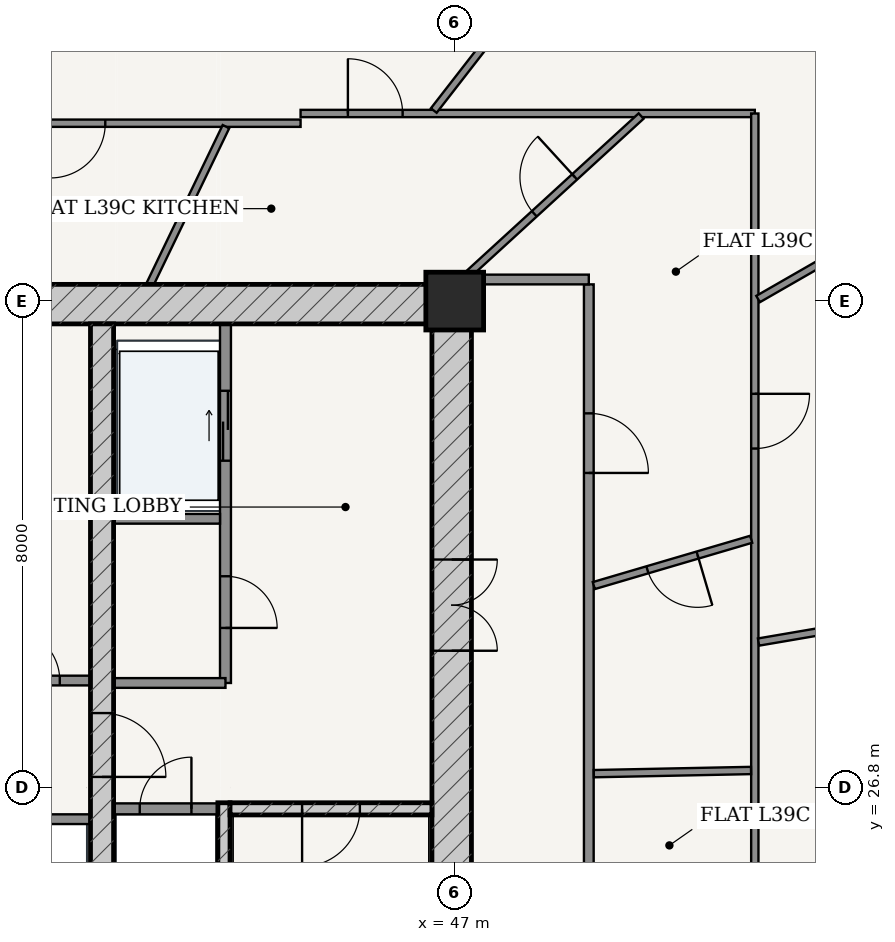
"""IFC4 building model, lengths in metres.
Left out: names, types, materials, properties, quantities, classifications, styles, units other than length and angle.
Written with IfcOpenShell. Run it as: python <this file> out.ifc"""

import sys

from ifc_helpers import new_model, si_unit, direction, frame, frame_2d, origin, origin_2d, place, context, subcontext, project, spatial, rectangle, extrude, source, transform, mapped, element, fill, save


model = new_model("IFC4")
c1 = context("Model", 3, precision=1e-05, world=origin(), true_north=direction((-0.2419218956, 0.970295726276)))
c2 = subcontext(c1, "Body", "Model", "MODEL_VIEW")
j1 = project(units=[si_unit("LENGTHUNIT", "METRE"), si_unit("PLANEANGLEUNIT", "RADIAN")], contexts=[c1])
p1 = place(None, origin())
s1 = spatial("IfcSite", under=j1, at=p1, CompositionType="ELEMENT")
p2 = place(p1, origin())
s2 = spatial("IfcBuilding", under=s1, at=p2, CompositionType="ELEMENT")
p3 = place(p2, frame((0.0, 0.0, 149.8)))
s3 = spatial("IfcBuildingStorey", under=s2, at=p3, CompositionType="ELEMENT", Elevation=149.8)
p4 = place(p3, frame((47.0, 34.8, 0.0), z_axis=(0.0, 0.0, 1.0), x_axis=(1.0, 0.0, 0.0)))
e1 = element("IfcColumn", 1, at=p4, inside=s3, PredefinedType="COLUMN", context=c2, shape_type="SweptSolid", body=[
    extrude(rectangle(XDim=0.95, YDim=0.95, at=origin_2d()), origin(), (0.0, 0.0, 1.0), 3.6),
])
p5 = place(p3, frame((28.725, 34.75, 0.0), z_axis=(0.0, 0.0, 1.0), x_axis=(1.0, 0.0, 0.0)))
e2 = element("IfcWall", 2, at=p5, inside=s3, PredefinedType="SHEAR", context=c2, shape_type="SweptSolid", body=[
    extrude(rectangle(XDim=18.55, YDim=0.65, at=frame_2d((9.275, 0.0))), origin(), (0.0, 0.0, 1.0), 3.33),
])
p6 = place(p3, frame((46.95, 19.175, 0.0), z_axis=(0.0, 0.0, 1.0), x_axis=(0.0, 1.0, 0.0)))
e3 = element("IfcWall", 3, at=p6, inside=s3, PredefinedType="SHEAR", context=c2, shape_type="SweptSolid", body=[
    extrude(rectangle(XDim=15.25, YDim=0.65, at=frame_2d((7.625, 0.0))), origin(), (0.0, 0.0, 1.0), 3.33),
])
p7 = place(p6, frame((9.875, 0.0, 0.0)))
e4 = element("IfcOpeningElement", 4, at=p7, cuts=e3, PredefinedType="OPENING", context=c2, shape_type="SweptSolid", body=[
    extrude(rectangle(XDim=1.5, YDim=2.2, at=frame_2d((0.75, 1.1))), frame((0.0, 0.335, 0.0), z_axis=(0.0, -1.0, 0.0), x_axis=(1.0, 0.0, 0.0)), (0.0, 0.0, 1.0), 0.67),
])
p8 = place(p3, frame((43.205, 19.175, 0.0), z_axis=(0.0, 0.0, 1.0), x_axis=(0.0, 1.0, 0.0)))
e5 = element("IfcWall", 5, at=p8, inside=s3, PredefinedType="SOLIDWALL", context=c2, shape_type="SweptSolid", body=[
    extrude(rectangle(XDim=7.375, YDim=0.2, at=frame_2d((3.688, 0.0))), origin(), (0.0, 0.0, 1.0), 3.33),
])
p9 = place(p3, frame((43.305, 26.45, 0.0), z_axis=(0.0, 0.0, 1.0), x_axis=(1.0, 0.0, 0.0)))
e6 = element("IfcWall", 6, at=p9, inside=s3, PredefinedType="SOLIDWALL", context=c2, shape_type="SweptSolid", body=[
    extrude(rectangle(XDim=3.32, YDim=0.2, at=frame_2d((1.66, 0.0))), origin(), (0.0, 0.0, 1.0), 3.33),
])
p10 = place(p9, frame((1.185, 0.0, 0.0)))
e7 = element("IfcOpeningElement", 7, at=p10, cuts=e6, PredefinedType="OPENING", context=c2, shape_type="SweptSolid", body=[
    extrude(rectangle(XDim=0.95, YDim=2.15, at=frame_2d((0.475, 1.075))), frame((0.0, 0.11, 0.0), z_axis=(0.0, -1.0, 0.0), x_axis=(1.0, 0.0, 0.0)), (0.0, 0.0, 1.0), 0.22),
])
p11 = place(p3, frame((41.2, 19.175, 0.0), z_axis=(0.0, 0.0, 1.0), x_axis=(0.0, 1.0, 0.0)))
e8 = element("IfcWall", 8, at=p11, inside=s3, PredefinedType="SHEAR", context=c2, shape_type="SweptSolid", body=[
    extrude(rectangle(XDim=15.25, YDim=0.38, at=frame_2d((7.625, 0.0))), origin(), (0.0, 0.0, 1.0), 3.33),
])
p12 = place(p11, frame((7.8, 0.0, 0.0)))
e9 = element("IfcOpeningElement", 9, at=p12, cuts=e8, PredefinedType="OPENING", context=c2, shape_type="SweptSolid", body=[
    extrude(rectangle(XDim=1.05, YDim=2.15, at=frame_2d((0.525, 1.075))), frame((0.0, 0.2, 0.0), z_axis=(0.0, -1.0, 0.0), x_axis=(1.0, 0.0, 0.0)), (0.0, 0.0, 1.0), 0.4),
])
p13 = place(p3, frame((41.39, 26.45, 0.0), z_axis=(0.0, 0.0, 1.0), x_axis=(1.0, 0.0, 0.0)))
e10 = element("IfcWall", 10, at=p13, inside=s3, PredefinedType="PARTITIONING", context=c2, shape_type="SweptSolid", body=[
    extrude(rectangle(XDim=1.71, YDim=0.18, at=frame_2d((0.855, 0.0))), origin(), (0.0, 0.0, 1.0), 3.33),
])
p14 = place(p13, frame((0.43, 0.0, 0.0)))
e11 = element("IfcOpeningElement", 11, at=p14, cuts=e10, PredefinedType="OPENING", context=c2, shape_type="SweptSolid", body=[
    extrude(rectangle(XDim=0.85, YDim=2.1, at=frame_2d((0.425, 1.05))), frame((0.0, 0.1, 0.0), z_axis=(0.0, -1.0, 0.0), x_axis=(1.0, 0.0, 0.0)), (0.0, 0.0, 1.0), 0.2),
])
p15 = place(p3, frame((43.23, 28.52, 0.0), z_axis=(0.0, 0.0, 1.0), x_axis=(0.0, 1.0, 0.0)))
e12 = element("IfcWall", 12, at=p15, inside=s3, PredefinedType="PARTITIONING", context=c2, shape_type="SweptSolid", body=[
    extrude(rectangle(XDim=5.905, YDim=0.18, at=frame_2d((2.953, 0.0))), origin(), (0.0, 0.0, 1.0), 3.33),
])
p16 = place(p15, frame((0.905, 0.0, 0.0)))
e13 = element("IfcOpeningElement", 13, at=p16, cuts=e12, PredefinedType="OPENING", context=c2, shape_type="SweptSolid", body=[
    extrude(rectangle(XDim=0.85, YDim=2.1, at=frame_2d((0.425, 1.05))), frame((0.0, 0.1, 0.0), z_axis=(0.0, -1.0, 0.0), x_axis=(1.0, 0.0, 0.0)), (0.0, 0.0, 1.0), 0.2),
])
p17 = place(p15, frame((3.655, 0.0, 0.0)))
e14 = element("IfcOpeningElement", 14, at=p17, cuts=e12, PredefinedType="OPENING", context=c2, shape_type="SweptSolid", body=[
    extrude(rectangle(XDim=1.15, YDim=2.2, at=frame_2d((0.575, 1.1))), frame((0.0, 0.1, 0.0), z_axis=(0.0, -1.0, 0.0), x_axis=(1.0, 0.0, 0.0)), (0.0, 0.0, 1.0), 0.2),
])
p18 = place(p3, frame((41.39, 31.22, 0.0), z_axis=(0.0, 0.0, 1.0), x_axis=(1.0, 0.0, 0.0)))
e15 = element("IfcWall", 15, at=p18, inside=s3, PredefinedType="PARTITIONING", context=c2, shape_type="SweptSolid", body=[
    extrude(rectangle(XDim=1.75, YDim=0.16, at=frame_2d((0.875, 0.0))), origin(), (0.0, 0.0, 1.0), 3.33),
])
p19 = place(p3, frame((41.39, 28.52, 0.0), z_axis=(0.0, 0.0, 1.0), x_axis=(1.0, 0.0, 0.0)))
e16 = element("IfcWall", 16, at=p19, inside=s3, PredefinedType="PARTITIONING", context=c2, shape_type="SweptSolid", body=[
    extrude(rectangle(XDim=1.84, YDim=0.16, at=frame_2d((0.92, 0.0))), origin(), (0.0, 0.0, 1.0), 3.33),
])
p20 = place(p3, frame((34.99, 28.56, 0.0), z_axis=(0.0, 0.0, 1.0), x_axis=(1.0, 0.0, 0.0)))
e17 = element("IfcWall", 17, at=p20, inside=s3, PredefinedType="PARTITIONING", context=c2, shape_type="SweptSolid", body=[
    extrude(rectangle(XDim=6.02, YDim=0.16, at=frame_2d((3.01, 0.0))), origin(), (0.0, 0.0, 1.0), 3.33),
])
p21 = place(p20, frame((0.505, 0.0, 0.0)))
e18 = element("IfcOpeningElement", 18, at=p21, cuts=e17, PredefinedType="OPENING", context=c2, shape_type="SweptSolid", body=[
    extrude(rectangle(XDim=0.85, YDim=2.1, at=frame_2d((0.425, 1.05))), frame((0.0, 0.09, 0.0), z_axis=(0.0, -1.0, 0.0), x_axis=(1.0, 0.0, 0.0)), (0.0, 0.0, 1.0), 0.18),
])
p22 = place(p20, frame((2.58, 0.0, 0.0)))
e19 = element("IfcOpeningElement", 19, at=p22, cuts=e17, PredefinedType="OPENING", context=c2, shape_type="SweptSolid", body=[
    extrude(rectangle(XDim=0.86, YDim=2.1, at=frame_2d((0.43, 1.05))), frame((0.0, 0.09, 0.0), z_axis=(0.0, -1.0, 0.0), x_axis=(1.0, 0.0, 0.0)), (0.0, 0.0, 1.0), 0.18),
])
p23 = place(p20, frame((4.665, 0.0, 0.0)))
e20 = element("IfcOpeningElement", 20, at=p23, cuts=e17, PredefinedType="OPENING", context=c2, shape_type="SweptSolid", body=[
    extrude(rectangle(XDim=0.85, YDim=2.1, at=frame_2d((0.425, 1.05))), frame((0.0, 0.09, 0.0), z_axis=(0.0, -1.0, 0.0), x_axis=(1.0, 0.0, 0.0)), (0.0, 0.0, 1.0), 0.18),
])
p24 = place(p3, frame((34.99, 26.28, 0.0), z_axis=(0.0, 0.0, 1.0), x_axis=(1.0, 0.0, 0.0)))
e21 = element("IfcWall", 21, at=p24, inside=s3, PredefinedType="PARTITIONING", context=c2, shape_type="SweptSolid", body=[
    extrude(rectangle(XDim=6.02, YDim=0.16, at=frame_2d((3.01, 0.0))), origin(), (0.0, 0.0, 1.0), 3.33),
])
p25 = place(p24, frame((0.225, 0.0, 0.0)))
e22 = element("IfcOpeningElement", 22, at=p25, cuts=e21, PredefinedType="OPENING", context=c2, shape_type="SweptSolid", body=[
    extrude(rectangle(XDim=1.1, YDim=2.2, at=frame_2d((0.55, 1.1))), frame((0.0, 0.09, 0.0), z_axis=(0.0, -1.0, 0.0), x_axis=(1.0, 0.0, 0.0)), (0.0, 0.0, 1.0), 0.18),
])
p26 = place(p24, frame((1.705, 0.0, 0.0)))
e23 = element("IfcOpeningElement", 23, at=p26, cuts=e21, PredefinedType="OPENING", context=c2, shape_type="SweptSolid", body=[
    extrude(rectangle(XDim=1.1, YDim=2.2, at=frame_2d((0.55, 1.1))), frame((0.0, 0.09, 0.0), z_axis=(0.0, -1.0, 0.0), x_axis=(1.0, 0.0, 0.0)), (0.0, 0.0, 1.0), 0.18),
])
p27 = place(p3, frame((49.205, 16.675, 0.0), z_axis=(0.0, 0.0, 1.0), x_axis=(0.0, 1.0, 0.0)))
e24 = element("IfcWall", 24, at=p27, inside=s3, PredefinedType="PARTITIONING", context=c2, shape_type="SweptSolid", body=[
    extrude(rectangle(XDim=18.4, YDim=0.16, at=frame_2d((9.2, 0.0))), origin(), (0.0, 0.0, 1.0), 2.776),
])
p28 = place(p27, frame((15.299, 0.0, 0.0)))
e25 = element("IfcOpeningElement", 25, at=p28, cuts=e24, PredefinedType="OPENING", context=c2, shape_type="SweptSolid", body=[
    extrude(rectangle(XDim=0.98, YDim=2.2, at=frame_2d((0.49, 1.1))), frame((0.0, 0.09, 0.0), z_axis=(0.0, -1.0, 0.0), x_axis=(1.0, 0.0, 0.0)), (0.0, 0.0, 1.0), 0.18),
])
p29 = place(p3, frame((47.275, 35.155, 0.0), z_axis=(0.0, 0.0, 1.0), x_axis=(1.0, 0.0, 0.0)))
e26 = element("IfcWall", 26, at=p29, inside=s3, PredefinedType="PARTITIONING", context=c2, shape_type="SweptSolid", body=[
    extrude(rectangle(XDim=1.93, YDim=0.16, at=frame_2d((0.965, 0.0))), origin(), (0.0, 0.0, 1.0), 2.776),
])
p30 = place(p3, frame((38.102, 37.725, 0.0), z_axis=(0.0, 0.0, 1.0), x_axis=(1.0, 0.0, 0.0)))
e27 = element("IfcWall", 27, at=p30, inside=s3, PredefinedType="PARTITIONING", context=c2, shape_type="SweptSolid", body=[
    extrude(rectangle(XDim=6.363, YDim=0.12, at=frame_2d((3.182, 0.0))), origin(), (0.0, 0.0, 1.0), 2.776),
])
p31 = place(p30, frame((2.251, 0.0, 0.0)))
e28 = element("IfcOpeningElement", 28, at=p31, cuts=e27, PredefinedType="OPENING", context=c2, shape_type="SweptSolid", body=[
    extrude(rectangle(XDim=0.9, YDim=2.15, at=frame_2d((0.45, 1.075))), frame((0.0, 0.07, 0.0), z_axis=(0.0, -1.0, 0.0), x_axis=(1.0, 0.0, 0.0)), (0.0, 0.0, 1.0), 0.14),
])
p32 = place(p3, frame((44.465, 37.885, 0.0), z_axis=(0.0, 0.0, 1.0), x_axis=(1.0, 0.0, 0.0)))
e29 = element("IfcWall", 29, at=p32, inside=s3, PredefinedType="PARTITIONING", context=c2, shape_type="SweptSolid", body=[
    extrude(rectangle(XDim=7.47, YDim=0.12, at=frame_2d((3.735, 0.0))), origin(), (0.0, 0.0, 1.0), 2.776),
])
p33 = place(p32, frame((0.778, 0.0, 0.0)))
e30 = element("IfcOpeningElement", 30, at=p33, cuts=e29, PredefinedType="OPENING", context=c2, shape_type="SweptSolid", body=[
    extrude(rectangle(XDim=0.9, YDim=2.15, at=frame_2d((0.45, 1.075))), frame((0.0, 0.07, 0.0), z_axis=(0.0, -1.0, 0.0), x_axis=(1.0, 0.0, 0.0)), (0.0, 0.0, 1.0), 0.14),
])
p34 = place(p3, frame((51.935, 37.885, 0.0), z_axis=(0.0, 0.0, 1.0), x_axis=(0.0, -1.0, 0.0)))
e31 = element("IfcWall", 31, at=p34, inside=s3, PredefinedType="PARTITIONING", context=c2, shape_type="SweptSolid", body=[
    extrude(rectangle(XDim=22.96, YDim=0.12, at=frame_2d((11.48, 0.0))), origin(), (0.0, 0.0, 1.0), 2.776),
])
p35 = place(p34, frame((4.61, 0.0, 0.0)))
e32 = element("IfcOpeningElement", 32, at=p35, cuts=e31, PredefinedType="OPENING", context=c2, shape_type="SweptSolid", body=[
    extrude(rectangle(XDim=0.9, YDim=2.15, at=frame_2d((0.45, 1.075))), frame((0.0, 0.07, 0.0), z_axis=(0.0, -1.0, 0.0), x_axis=(1.0, 0.0, 0.0)), (0.0, 0.0, 1.0), 0.14),
])
p36 = place(p34, frame((19.31, 0.0, 0.0)))
e33 = element("IfcOpeningElement", 33, at=p36, cuts=e31, PredefinedType="OPENING", context=c2, shape_type="SweptSolid", body=[
    extrude(rectangle(XDim=0.86, YDim=2.15, at=frame_2d((0.43, 1.075))), frame((0.0, 0.07, 0.0), z_axis=(0.0, -1.0, 0.0), x_axis=(1.0, 0.0, 0.0)), (0.0, 0.0, 1.0), 0.14),
])
p37 = place(p34, frame((13.341, 0.0, 0.0)))
e34 = element("IfcOpeningElement", 34, at=p37, cuts=e31, PredefinedType="OPENING", context=c2, shape_type="SweptSolid", body=[
    extrude(rectangle(XDim=0.9, YDim=2.15, at=frame_2d((0.45, 1.075))), frame((0.0, 0.07, 0.0), z_axis=(0.0, -1.0, 0.0), x_axis=(1.0, 0.0, 0.0)), (0.0, 0.0, 1.0), 0.14),
])
p38 = place(p3, frame((51.996, 29.193, 0.0), z_axis=(0.0, 0.0, 1.0), x_axis=(0.985698378271, 0.168519159369, 0.0)))
e35 = element("IfcWall", 35, at=p38, inside=s3, PredefinedType="PARTITIONING", context=c2, shape_type="SweptSolid", body=[
    extrude(rectangle(XDim=9.769, YDim=0.12, at=frame_2d((4.884, 0.0))), origin(), (0.0, 0.0, 1.0), 2.776),
])
p39 = place(p38, frame((3.428, 0.0, 0.0)))
e36 = element("IfcOpeningElement", 36, at=p39, cuts=e35, PredefinedType="OPENING", context=c2, shape_type="SweptSolid", body=[
    extrude(rectangle(XDim=0.9, YDim=2.15, at=frame_2d((0.45, 1.075))), frame((0.0, 0.07, 0.0), z_axis=(0.0, -1.0, 0.0), x_axis=(1.0, 0.0, 0.0)), (0.0, 0.0, 1.0), 0.14),
])
p40 = place(p3, frame((51.989, 34.834, 0.0), z_axis=(0.0, 0.0, 1.0), x_axis=(0.86717064002, 0.498011125466, 0.0)))
e37 = element("IfcWall", 37, at=p40, inside=s3, PredefinedType="PARTITIONING", context=c2, shape_type="SweptSolid", body=[
    extrude(rectangle(XDim=6.961, YDim=0.12, at=frame_2d((3.48, 0.0))), origin(), (0.0, 0.0, 1.0), 2.776),
])
p41 = place(p3, frame((46.656, 37.934, 0.0), z_axis=(0.0, 0.0, 1.0), x_axis=(0.613758289074, 0.789493991487, 0.0)))
e38 = element("IfcWall", 38, at=p41, inside=s3, PredefinedType="PARTITIONING", context=c2, shape_type="SweptSolid", body=[
    extrude(rectangle(XDim=7.695, YDim=0.12, at=frame_2d((3.848, 0.0))), origin(), (0.0, 0.0, 1.0), 2.776),
])
p42 = place(p41, frame((2.395, 0.0, 0.0)))
e39 = element("IfcOpeningElement", 39, at=p42, cuts=e38, PredefinedType="OPENING", context=c2, shape_type="SweptSolid", body=[
    extrude(rectangle(XDim=0.9, YDim=2.15, at=frame_2d((0.45, 1.075))), frame((0.0, 0.07, 0.0), z_axis=(0.0, -1.0, 0.0), x_axis=(1.0, 0.0, 0.0)), (0.0, 0.0, 1.0), 0.14),
])
p43 = place(p3, frame((49.287, 27.029, 0.0), z_axis=(0.0, 0.0, 1.0), x_axis=(0.999794052369, 0.020294157974, 0.0)))
e40 = element("IfcWall", 40, at=p43, inside=s3, PredefinedType="PARTITIONING", context=c2, shape_type="SweptSolid", body=[
    extrude(rectangle(XDim=2.586, YDim=0.12, at=frame_2d((1.293, 0.0))), origin(), (0.0, 0.0, 1.0), 3.33),
])
p44 = place(p3, frame((49.287, 30.121, 0.0), z_axis=(0.0, 0.0, 1.0), x_axis=(0.959304970846, 0.282372046969, 0.0)))
e41 = element("IfcWall", 41, at=p44, inside=s3, PredefinedType="PARTITIONING", context=c2, shape_type="SweptSolid", body=[
    extrude(rectangle(XDim=2.698, YDim=0.12, at=frame_2d((1.349, 0.0))), origin(), (0.0, 0.0, 1.0), 3.33),
])
p45 = place(p44, frame((0.919, 0.0, 0.0)))
e42 = element("IfcOpeningElement", 42, at=p45, cuts=e41, PredefinedType="OPENING", context=c2, shape_type="SweptSolid", body=[
    extrude(rectangle(XDim=0.86, YDim=2.15, at=frame_2d((0.43, 1.075))), frame((0.0, 0.07, 0.0), z_axis=(0.0, -1.0, 0.0), x_axis=(1.0, 0.0, 0.0)), (0.0, 0.0, 1.0), 0.14),
])
p46 = place(p3, frame((47.216, 35.235, 0.0), z_axis=(0.0, 0.0, 1.0), x_axis=(0.73766811085, 0.675163504816, 0.0)))
e43 = element("IfcWall", 43, at=p46, inside=s3, PredefinedType="PARTITIONING", context=c2, shape_type="SweptSolid", body=[
    extrude(rectangle(XDim=3.863, YDim=0.12, at=frame_2d((1.932, 0.0))), origin(), (0.0, 0.0, 1.0), 2.776),
])
p47 = place(p46, frame((1.481, 0.0, 0.0)))
e44 = element("IfcOpeningElement", 44, at=p47, cuts=e43, PredefinedType="OPENING", context=c2, shape_type="SweptSolid", body=[
    extrude(rectangle(XDim=0.9, YDim=2.15, at=frame_2d((0.45, 1.075))), frame((0.0, 0.07, 0.0), z_axis=(0.0, -1.0, 0.0), x_axis=(1.0, 0.0, 0.0)), (0.0, 0.0, 1.0), 0.14),
])
p48 = place(p3, frame((41.988, 35.075, 0.0), z_axis=(0.0, 0.0, 1.0), x_axis=(0.434144408634, 0.900843289619, 0.0)))
e45 = element("IfcWall", 45, at=p48, inside=s3, PredefinedType="PARTITIONING", context=c2, shape_type="SweptSolid", body=[
    extrude(rectangle(XDim=2.88, YDim=0.12, at=frame_2d((1.44, 0.0))), origin(), (0.0, 0.0, 1.0), 3.33),
])
m1 = source(origin(), c2, "Body", "SweptSolid", [
    extrude(rectangle(XDim=1.5, YDim=2.2, at=frame_2d((0.75, 1.1))), frame((0.0, 0.025, 0.0), z_axis=(0.0, -1.0, 0.0), x_axis=(1.0, 0.0, 0.0)), (0.0, 0.0, 1.0), 0.05),
])
p49 = place(p7, frame((1.5, 0.0, 0.0), z_axis=(0.0, 0.0, 1.0), x_axis=(-1.0, 0.0, 0.0)))
e46 = element("IfcDoor", 46, at=p49, inside=s3, OperationType="DOUBLE_DOOR_SINGLE_SWING", PredefinedType="DOOR", context=c2, shape_type="MappedRepresentation", body=[
    mapped(m1, transform((0.0, 0.0, 0.0), scale=1.0)),
])
fill(e4, e46)
m2 = source(origin(), c2, "Body", "SweptSolid", [
    extrude(rectangle(XDim=1.05, YDim=2.15, at=frame_2d((0.525, 1.075))), frame((0.0, 0.025, 0.0), z_axis=(0.0, -1.0, 0.0), x_axis=(1.0, 0.0, 0.0)), (0.0, 0.0, 1.0), 0.05),
])
p50 = place(p12, frame((1.05, 0.0, 0.0), z_axis=(0.0, 0.0, 1.0), x_axis=(-1.0, 0.0, 0.0)))
e47 = element("IfcDoor", 47, at=p50, inside=s3, OperationType="SINGLE_SWING_RIGHT", PredefinedType="DOOR", context=c2, shape_type="MappedRepresentation", body=[
    mapped(m2, transform((0.0, 0.0, 0.0), scale=1.0)),
])
fill(e9, e47)
m3 = source(origin(), c2, "Body", "SweptSolid", [
    extrude(rectangle(XDim=0.95, YDim=2.15, at=frame_2d((0.475, 1.075))), frame((0.0, 0.025, 0.0), z_axis=(0.0, -1.0, 0.0), x_axis=(1.0, 0.0, 0.0)), (0.0, 0.0, 1.0), 0.05),
])
p51 = place(p10, frame((0.95, 0.0, 0.0), z_axis=(0.0, 0.0, 1.0), x_axis=(-1.0, 0.0, 0.0)))
e48 = element("IfcDoor", 48, at=p51, inside=s3, OperationType="SINGLE_SWING_RIGHT", PredefinedType="DOOR", context=c2, shape_type="MappedRepresentation", body=[
    mapped(m3, transform((0.0, 0.0, 0.0), scale=1.0)),
])
fill(e7, e48)
m4 = source(origin(), c2, "Body", "SweptSolid", [
    extrude(rectangle(XDim=0.85, YDim=2.1, at=frame_2d((0.425, 1.05))), frame((0.0, 0.025, 0.0), z_axis=(0.0, -1.0, 0.0), x_axis=(1.0, 0.0, 0.0)), (0.0, 0.0, 1.0), 0.05),
])
p52 = place(p14, origin())
e49 = element("IfcDoor", 49, at=p52, inside=s3, OperationType="SINGLE_SWING_RIGHT", PredefinedType="DOOR", context=c2, shape_type="MappedRepresentation", body=[
    mapped(m4, transform((0.0, 0.0, 0.0), scale=1.0)),
])
fill(e11, e49)
p53 = place(p16, frame((0.85, 0.0, 0.0), z_axis=(0.0, 0.0, 1.0), x_axis=(-1.0, 0.0, 0.0)))
e50 = element("IfcDoor", 50, at=p53, inside=s3, OperationType="SINGLE_SWING_RIGHT", PredefinedType="DOOR", context=c2, shape_type="MappedRepresentation", body=[
    mapped(m4, transform((0.0, 0.0, 0.0), scale=1.0)),
])
fill(e13, e50)
p54 = place(p23, origin())
e51 = element("IfcDoor", 51, at=p54, inside=s3, OperationType="SINGLE_SWING_LEFT", PredefinedType="DOOR", context=c2, shape_type="MappedRepresentation", body=[
    mapped(m4, transform((0.0, 0.0, 0.0), scale=1.0)),
])
fill(e20, e51)
m5 = source(origin(), c2, "Body", "SweptSolid", [
    extrude(rectangle(XDim=1.15, YDim=2.2, at=frame_2d((0.575, 1.1))), frame((0.0, 0.025, 0.0), z_axis=(0.0, -1.0, 0.0), x_axis=(1.0, 0.0, 0.0)), (0.0, 0.0, 1.0), 0.05),
])
p55 = place(p17, origin())
e52 = element("IfcDoor", 52, at=p55, inside=s3, OperationType="DOUBLE_DOOR_SLIDING", PredefinedType="DOOR", context=c2, shape_type="MappedRepresentation", body=[
    mapped(m5, transform((0.0, 0.0, 0.0), scale=1.0)),
])
fill(e14, e52)
m6 = source(origin(), c2, "Body", "SweptSolid", [
    extrude(rectangle(XDim=0.98, YDim=2.2, at=frame_2d((0.49, 1.1))), frame((0.0, 0.025, 0.0), z_axis=(0.0, -1.0, 0.0), x_axis=(1.0, 0.0, 0.0)), (0.0, 0.0, 1.0), 0.05),
])
p56 = place(p28, frame((0.98, 0.0, 0.0), z_axis=(0.0, 0.0, 1.0), x_axis=(-1.0, 0.0, 0.0)))
e53 = element("IfcDoor", 53, at=p56, inside=s3, OperationType="SINGLE_SWING_RIGHT", PredefinedType="DOOR", context=c2, shape_type="MappedRepresentation", body=[
    mapped(m6, transform((0.0, 0.0, 0.0), scale=1.0)),
])
fill(e25, e53)
m7 = source(origin(), c2, "Body", "SweptSolid", [
    extrude(rectangle(XDim=0.86, YDim=2.15, at=frame_2d((0.43, 1.075))), frame((0.0, 0.025, 0.0), z_axis=(0.0, -1.0, 0.0), x_axis=(1.0, 0.0, 0.0)), (0.0, 0.0, 1.0), 0.05),
])
p57 = place(p45, frame((0.86, 0.0, 0.0), z_axis=(0.0, 0.0, 1.0), x_axis=(-1.0, 0.0, 0.0)))
e54 = element("IfcDoor", 54, at=p57, inside=s3, OperationType="SINGLE_SWING_LEFT", PredefinedType="DOOR", context=c2, shape_type="MappedRepresentation", body=[
    mapped(m7, transform((0.0, 0.0, 0.0), scale=1.0)),
])
fill(e42, e54)
m8 = source(origin(), c2, "Body", "SweptSolid", [
    extrude(rectangle(XDim=0.9, YDim=2.15, at=frame_2d((0.45, 1.075))), frame((0.0, 0.025, 0.0), z_axis=(0.0, -1.0, 0.0), x_axis=(1.0, 0.0, 0.0)), (0.0, 0.0, 1.0), 0.05),
])
p58 = place(p47, origin())
e55 = element("IfcDoor", 55, at=p58, inside=s3, OperationType="SINGLE_SWING_RIGHT", PredefinedType="DOOR", context=c2, shape_type="MappedRepresentation", body=[
    mapped(m8, transform((0.0, 0.0, 0.0), scale=1.0)),
])
fill(e44, e55)
p59 = place(p33, origin())
e56 = element("IfcDoor", 56, at=p59, inside=s3, OperationType="SINGLE_SWING_LEFT", PredefinedType="DOOR", context=c2, shape_type="MappedRepresentation", body=[
    mapped(m8, transform((0.0, 0.0, 0.0), scale=1.0)),
])
fill(e30, e56)
p60 = place(p31, frame((0.9, 0.0, 0.0), z_axis=(0.0, 0.0, 1.0), x_axis=(-1.0, 0.0, 0.0)))
e57 = element("IfcDoor", 57, at=p60, inside=s3, OperationType="SINGLE_SWING_RIGHT", PredefinedType="DOOR", context=c2, shape_type="MappedRepresentation", body=[
    mapped(m8, transform((0.0, 0.0, 0.0), scale=1.0)),
])
fill(e28, e57)
p61 = place(p35, origin())
e58 = element("IfcDoor", 58, at=p61, inside=s3, OperationType="SINGLE_SWING_LEFT", PredefinedType="DOOR", context=c2, shape_type="MappedRepresentation", body=[
    mapped(m8, transform((0.0, 0.0, 0.0), scale=1.0)),
])
fill(e32, e58)
save(model, sys.argv[1])
